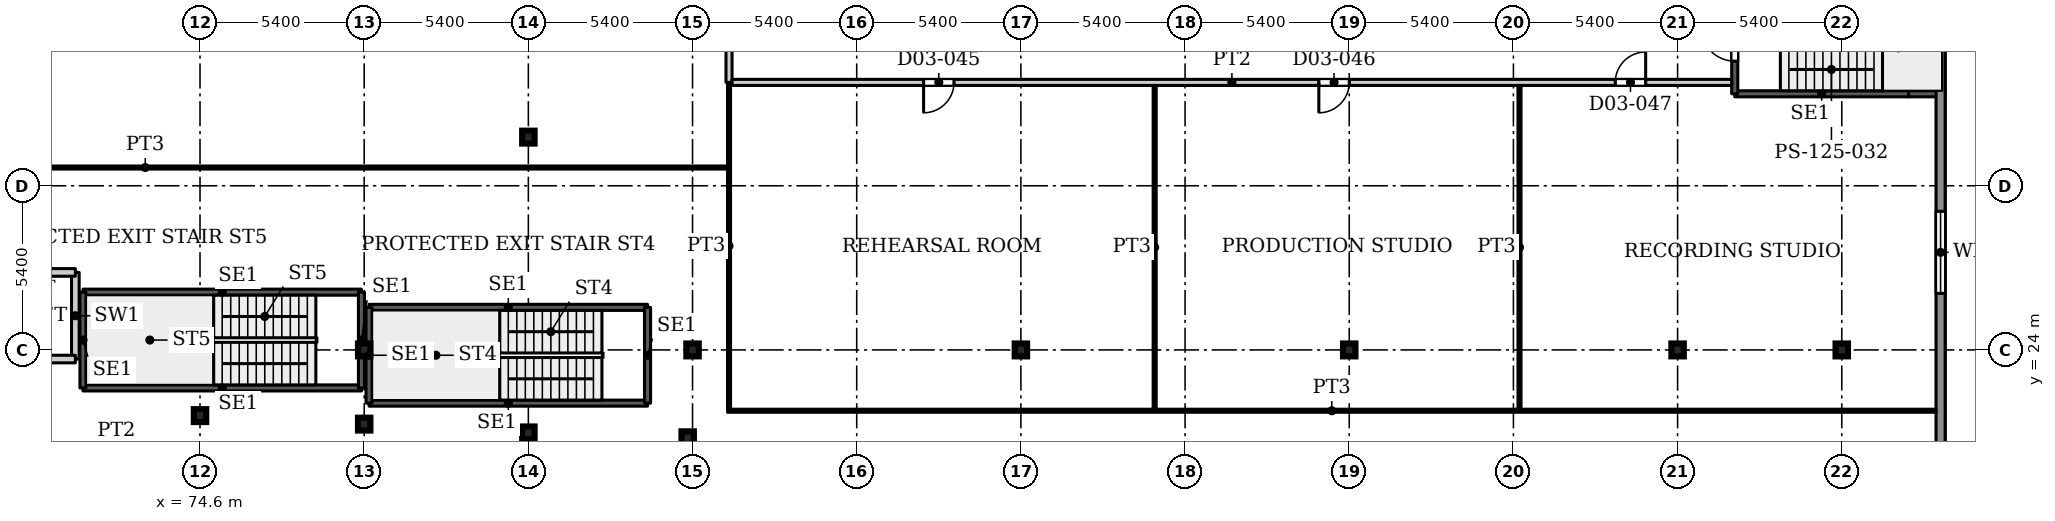
"""IFC4 building model, lengths in metres.
Left out: names, types, materials, properties, quantities, classifications, styles, units other than length and angle.
Written with IfcOpenShell. Run it as: python <this file> out.ifc"""

import sys

from ifc_helpers import new_model, si_unit, direction, frame, frame_2d, origin, origin_2d, place, context, subcontext, project, spatial, rectangle, i_section, extrude, source, transform, mapped, element, fill, save


model = new_model("IFC4")
c1 = context("Model", 3, precision=1e-05, world=origin(), true_north=direction((0.0, 1.0)))
c2 = subcontext(c1, "Body", "Model", "MODEL_VIEW")
j1 = project(units=[si_unit("LENGTHUNIT", "METRE"), si_unit("PLANEANGLEUNIT", "RADIAN")], contexts=[c1])
p1 = place(None, origin())
s1 = spatial("IfcSite", under=j1, at=p1, CompositionType="ELEMENT")
p2 = place(p1, origin())
s2 = spatial("IfcBuilding", under=s1, at=p2, CompositionType="ELEMENT")
p3 = place(p2, frame((0.0, 0.0, 17.0)))
s3 = spatial("IfcBuildingStorey", under=s2, at=p3, CompositionType="ELEMENT", Elevation=17.0)
for number, where, z_axis, x_axis in (
    (1, (80.0, 24.0, 0.0), (0.0, 0.0, 1.0), (1.0, 0.0, 0.0)),
    (2, (90.8, 24.0, 0.0), (0.0, 0.0, 1.0), (1.0, 0.0, 0.0)),
    (3, (101.6, 24.0, 0.0), (0.0, 0.0, 1.0), (1.0, 0.0, 0.0)),
    (4, (112.4, 24.0, 0.0), (0.0, 0.0, 1.0), (1.0, 0.0, 0.0)),
    (5, (123.2, 24.0, 0.0), (0.0, 0.0, 1.0), (1.0, 0.0, 0.0)),
    (6, (128.6, 24.0, 0.0), (0.0, 0.0, 1.0), (1.0, 0.0, 0.0)),
    (7, (90.64, 21.11, 0.0), (0.0, 0.0, 1.0), (1.0, 0.0, 0.0)),
    (8, (85.4, 21.27, 0.0), (0.0, 0.0, 1.0), (1.0, 0.0, 0.0)),
    (9, (80.0, 21.56, 0.0), (0.0, 0.0, 1.0), (1.0, 0.0, 0.0)),
    (10, (74.6, 21.84, 0.0), (0.0, 0.0, 1.0), (1.0, 0.0, 0.0)),
    (11, (85.4, 31.0, 0.0), (0.0, 0.0, 1.0), (1.0, 0.0, 0.0)),
):
    element("IfcColumn", number, at=place(p3, frame(where, z_axis=z_axis, x_axis=x_axis)), inside=s3, PredefinedType="COLUMN", context=c2, shape_type="SweptSolid", body=[
        extrude(i_section(OverallWidth=0.409, OverallDepth=0.425, WebThickness=0.033, FlangeThickness=0.052, FilletRadius=0.013, at=origin_2d()), origin(), (0.0, 0.0, 1.0), 4.5),
    ])
p4 = place(p3, frame((131.85, 54.72, 0.0), z_axis=(0.0, 0.0, 1.0), x_axis=(0.0, -1.0, 0.0)))
e12 = element("IfcWall", 12, at=p4, inside=s3, PredefinedType="SOLIDWALL", context=c2, shape_type="SweptSolid", body=[
    extrude(rectangle(XDim=38.72, YDim=0.3, at=frame_2d((19.36, 0.0))), origin(), (0.0, 0.0, 1.0), 4.25),
])
p5 = place(p4, frame((2.435, 0.0, 0.9)))
e13 = element("IfcOpeningElement", 13, at=p5, cuts=e12, PredefinedType="OPENING", context=c2, shape_type="SweptSolid", body=[
    extrude(rectangle(XDim=2.7, YDim=2.1, at=frame_2d((1.35, 1.05))), frame((0.0, 0.16, 0.0), z_axis=(0.0, -1.0, 0.0), x_axis=(1.0, 0.0, 0.0)), (0.0, 0.0, 1.0), 0.32),
])
p6 = place(p4, frame((13.58, 0.0, 0.9)))
e14 = element("IfcOpeningElement", 14, at=p6, cuts=e12, PredefinedType="OPENING", context=c2, shape_type="SweptSolid", body=[
    extrude(rectangle(XDim=2.7, YDim=2.1, at=frame_2d((1.35, 1.05))), frame((0.0, 0.16, 0.0), z_axis=(0.0, -1.0, 0.0), x_axis=(1.0, 0.0, 0.0)), (0.0, 0.0, 1.0), 0.32),
])
p7 = place(p4, frame((26.16, 0.0, 0.9)))
e15 = element("IfcOpeningElement", 15, at=p7, cuts=e12, PredefinedType="OPENING", context=c2, shape_type="SweptSolid", body=[
    extrude(rectangle(XDim=2.7, YDim=2.1, at=frame_2d((1.35, 1.05))), frame((0.0, 0.16, 0.0), z_axis=(0.0, -1.0, 0.0), x_axis=(1.0, 0.0, 0.0)), (0.0, 0.0, 1.0), 0.32),
])
for number, where, z_axis, x_axis in (
    (16, (80.16, 22.25, 0.0), (0.0, 0.0, 1.0), (1.0, 0.0, 0.0)),
    (17, (80.16, 25.4, 0.0), (0.0, 0.0, 1.0), (1.0, 0.0, 0.0)),
):
    element("IfcWall", number, at=place(p3, frame(where, z_axis=z_axis, x_axis=x_axis)), inside=s3, PredefinedType="SHEAR", context=c2, shape_type="SweptSolid", body=[
        extrude(rectangle(XDim=9.16, YDim=0.2, at=frame_2d((4.58, 0.0))), origin(), (0.0, 0.0, 1.0), 4.5),
    ])
for number, where, z_axis, x_axis in (
    (18, (80.16, 22.25, 0.0), (0.0, 0.0, 1.0), (0.0, 1.0, 0.0)),
    (19, (89.32, 22.25, 0.0), (0.0, 0.0, 1.0), (0.0, 1.0, 0.0)),
):
    element("IfcWall", number, at=place(p3, frame(where, z_axis=z_axis, x_axis=x_axis)), inside=s3, PredefinedType="SHEAR", context=c2, shape_type="SweptSolid", body=[
        extrude(rectangle(XDim=3.15, YDim=0.2, at=frame_2d((1.575, 0.0))), origin(), (0.0, 0.0, 1.0), 4.5),
    ])
for number, where, z_axis, x_axis in (
    (20, (70.75, 22.75, 0.0), (0.0, 0.0, 1.0), (1.0, 0.0, 0.0)),
    (21, (70.75, 25.9, 0.0), (0.0, 0.0, 1.0), (1.0, 0.0, 0.0)),
):
    element("IfcWall", number, at=place(p3, frame(where, z_axis=z_axis, x_axis=x_axis)), inside=s3, PredefinedType="SHEAR", context=c2, shape_type="SweptSolid", body=[
        extrude(rectangle(XDim=9.16, YDim=0.2, at=frame_2d((4.58, 0.0))), origin(), (0.0, 0.0, 1.0), 4.5),
    ])
for number, where, z_axis, x_axis in (
    (22, (70.75, 22.75, 0.0), (0.0, 0.0, 1.0), (0.0, 1.0, 0.0)),
    (23, (79.91, 22.75, 0.0), (0.0, 0.0, 1.0), (0.0, 1.0, 0.0)),
):
    element("IfcWall", number, at=place(p3, frame(where, z_axis=z_axis, x_axis=x_axis)), inside=s3, PredefinedType="SHEAR", context=c2, shape_type="SweptSolid", body=[
        extrude(rectangle(XDim=3.15, YDim=0.2, at=frame_2d((1.575, 0.0))), origin(), (0.0, 0.0, 1.0), 4.5),
    ])
p8 = place(p3, frame((70.5, 23.7, 0.0), z_axis=(0.0, 0.0, 1.0), x_axis=(0.0, 1.0, 0.0)))
e24 = element("IfcWall", 24, at=p8, inside=s3, PredefinedType="PARTITIONING", context=c2, shape_type="SweptSolid", body=[
    extrude(rectangle(XDim=2.85, YDim=0.25, at=frame_2d((1.425, 0.0))), origin(), (0.0, 0.0, 1.0), 4.5),
])
for number, where, z_axis, x_axis in (
    (25, (53.4, 23.7, 0.0), (0.0, 0.0, 1.0), (1.0, 0.0, 0.0)),
    (26, (53.4, 26.55, 0.0), (0.0, 0.0, 1.0), (1.0, 0.0, 0.0)),
):
    element("IfcWall", number, at=place(p3, frame(where, z_axis=z_axis, x_axis=x_axis)), inside=s3, PredefinedType="PARTITIONING", context=c2, shape_type="SweptSolid", body=[
        extrude(rectangle(XDim=17.1, YDim=0.25, at=frame_2d((8.55, 0.0))), origin(), (0.0, 0.0, 1.0), 4.5),
    ])
p9 = place(p3, frame((125.08, 32.425, 0.0), z_axis=(0.0, 0.0, 1.0), x_axis=(1.0, 0.0, 0.0)))
e27 = element("IfcWall", 27, at=p9, inside=s3, PredefinedType="SHEAR", context=c2, shape_type="SweptSolid", body=[
    extrude(rectangle(XDim=5.72, YDim=0.2, at=frame_2d((2.86, 0.0))), origin(), (0.0, 0.0, 1.0), 4.5),
])
p10 = place(p3, frame((130.8, 32.425, 0.0), z_axis=(0.0, 0.0, 1.0), x_axis=(1.0, 0.0, 0.0)))
e28 = element("IfcWall", 28, at=p10, inside=s3, PredefinedType="SHEAR", context=c2, shape_type="SweptSolid", body=[
    extrude(rectangle(XDim=1.2, YDim=0.2, at=frame_2d((0.6, 0.0))), origin(), (0.0, 0.0, 1.0), 4.5),
])
p11 = place(p3, frame((125.08, 32.425, 0.0), z_axis=(0.0, 0.0, 1.0), x_axis=(0.0, 1.0, 0.0)))
e29 = element("IfcWall", 29, at=p11, inside=s3, PredefinedType="SHEAR", context=c2, shape_type="SweptSolid", body=[
    extrude(rectangle(XDim=3.15, YDim=0.2, at=frame_2d((1.575, 0.0))), origin(), (0.0, 0.0, 1.0), 4.5),
])
p12 = place(p11, frame((1.075, 0.0, 0.0)))
e30 = element("IfcOpeningElement", 30, at=p12, cuts=e29, PredefinedType="OPENING", context=c2, shape_type="SweptSolid", body=[
    extrude(rectangle(XDim=1.1, YDim=2.2, at=frame_2d((0.55, 1.1))), frame((0.0, 0.11, 0.0), z_axis=(0.0, -1.0, 0.0), x_axis=(1.0, 0.0, 0.0)), (0.0, 0.0, 1.0), 0.22),
])
p13 = place(p3, frame((53.649, 30.0, 0.0), z_axis=(0.0, 0.0, 1.0), x_axis=(1.0, 0.0, 0.0)))
e31 = element("IfcWall", 31, at=p13, inside=s3, PredefinedType="PARTITIONING", context=c2, shape_type="SweptSolid", body=[
    extrude(rectangle(XDim=38.301, YDim=0.1, at=frame_2d((19.15, 0.0))), origin(), (0.0, 0.0, 1.0), 4.18),
])
p14 = place(p3, frame((91.95, 22.0, 0.0), z_axis=(0.0, 0.0, 1.0), x_axis=(1.0, 0.0, 0.0)))
e32 = element("IfcWall", 32, at=p14, inside=s3, PredefinedType="PARTITIONING", context=c2, shape_type="SweptSolid", body=[
    extrude(rectangle(XDim=39.751, YDim=0.1, at=frame_2d((19.875, 0.0))), origin(), (0.0, 0.0, 1.0), 4.18),
])
p15 = place(p3, frame((92.0, 22.05, 0.0), z_axis=(0.0, 0.0, 1.0), x_axis=(0.0, 1.0, 0.0)))
e33 = element("IfcWall", 33, at=p15, inside=s3, PredefinedType="PARTITIONING", context=c2, shape_type="SweptSolid", body=[
    extrude(rectangle(XDim=10.75, YDim=0.1, at=frame_2d((5.375, 0.0))), origin(), (0.0, 0.0, 1.0), 4.18),
])
p16 = place(p3, frame((92.0, 32.8, 0.0), z_axis=(0.0, 0.0, 1.0), x_axis=(0.0, 1.0, 0.0)))
e34 = element("IfcWall", 34, at=p16, inside=s3, PredefinedType="PARTITIONING", context=c2, shape_type="SweptSolid", body=[
    extrude(rectangle(XDim=2.4, YDim=0.2, at=frame_2d((1.2, 0.0))), origin(), (0.0, 0.0, 1.0), 4.18),
])
p17 = place(p3, frame((92.1, 32.8, 0.0), z_axis=(0.0, 0.0, 1.0), x_axis=(1.0, 0.0, 0.0)))
e35 = element("IfcWall", 35, at=p17, inside=s3, PredefinedType="PARTITIONING", context=c2, shape_type="SweptSolid", body=[
    extrude(rectangle(XDim=32.881, YDim=0.2, at=frame_2d((16.44, 0.0))), origin(), (0.0, 0.0, 1.0), 4.18),
])
p18 = place(p17, frame((6.3, 0.0, 0.0)))
e36 = element("IfcOpeningElement", 36, at=p18, cuts=e35, PredefinedType="OPENING", context=c2, shape_type="SweptSolid", body=[
    extrude(rectangle(XDim=1.0, YDim=2.1, at=frame_2d((0.5, 1.05))), frame((0.0, 0.11, 0.0), z_axis=(0.0, -1.0, 0.0), x_axis=(1.0, 0.0, 0.0)), (0.0, 0.0, 1.0), 0.22),
])
p19 = place(p17, frame((19.3, 0.0, 0.0)))
e37 = element("IfcOpeningElement", 37, at=p19, cuts=e35, PredefinedType="OPENING", context=c2, shape_type="SweptSolid", body=[
    extrude(rectangle(XDim=1.0, YDim=2.1, at=frame_2d((0.5, 1.05))), frame((0.0, 0.11, 0.0), z_axis=(0.0, -1.0, 0.0), x_axis=(1.0, 0.0, 0.0)), (0.0, 0.0, 1.0), 0.22),
])
p20 = place(p17, frame((29.05, 0.0, 0.0)))
e38 = element("IfcOpeningElement", 38, at=p20, cuts=e35, PredefinedType="OPENING", context=c2, shape_type="SweptSolid", body=[
    extrude(rectangle(XDim=1.0, YDim=2.1, at=frame_2d((0.5, 1.05))), frame((0.0, 0.11, 0.0), z_axis=(0.0, -1.0, 0.0), x_axis=(1.0, 0.0, 0.0)), (0.0, 0.0, 1.0), 0.22),
])
for number, where, z_axis, x_axis in (
    (39, (106.0, 22.05, 0.0), (0.0, 0.0, 1.0), (0.0, 1.0, 0.0)),
    (40, (118.0, 22.05, 0.0), (0.0, 0.0, 1.0), (0.0, 1.0, 0.0)),
):
    element("IfcWall", number, at=place(p3, frame(where, z_axis=z_axis, x_axis=x_axis)), inside=s3, PredefinedType="PARTITIONING", context=c2, shape_type="SweptSolid", body=[
        extrude(rectangle(XDim=10.65, YDim=0.1, at=frame_2d((5.325, 0.0))), origin(), (0.0, 0.0, 1.0), 4.18),
    ])
m1 = source(origin(), c2, "Body", "SweptSolid", [
    extrude(rectangle(XDim=2.7, YDim=2.1, at=frame_2d((1.35, 1.05))), frame((0.0, 0.03, 0.0), z_axis=(0.0, -1.0, 0.0), x_axis=(1.0, 0.0, 0.0)), (0.0, 0.0, 1.0), 0.06),
])
p21 = place(p7, origin())
e41 = element("IfcWindow", 41, at=p21, inside=s3, PartitioningType="SINGLE_PANEL", PredefinedType="WINDOW", context=c2, shape_type="MappedRepresentation", body=[
    mapped(m1, transform((0.0, 0.0, 0.0), x_axis=(1.0, 0.0, 0.0), y_axis=(0.0, 1.0, 0.0), z_axis=(0.0, 0.0, 1.0), scale=1.0)),
])
fill(e15, e41)
m2 = source(origin(), c2, "Body", "SweptSolid", [
    extrude(rectangle(XDim=1.1, YDim=2.2, at=frame_2d((0.55, 1.1))), frame((0.0, 0.025, 0.0), z_axis=(0.0, -1.0, 0.0), x_axis=(1.0, 0.0, 0.0)), (0.0, 0.0, 1.0), 0.05),
])
p22 = place(p12, origin())
e42 = element("IfcDoor", 42, at=p22, inside=s3, OperationType="SINGLE_SWING_LEFT", PredefinedType="DOOR", context=c2, shape_type="MappedRepresentation", body=[
    mapped(m2, transform((0.0, 0.0, 0.0), x_axis=(1.0, 0.0, 0.0), y_axis=(0.0, 1.0, 0.0), z_axis=(0.0, 0.0, 1.0), scale=1.0)),
])
fill(e30, e42)
m3 = source(origin(), c2, "Body", "SweptSolid", [
    extrude(rectangle(XDim=1.0, YDim=2.1, at=frame_2d((0.5, 1.05))), frame((0.0, 0.025, 0.0), z_axis=(0.0, -1.0, 0.0), x_axis=(1.0, 0.0, 0.0)), (0.0, 0.0, 1.0), 0.05),
])
p23 = place(p18, origin())
e43 = element("IfcDoor", 43, at=p23, inside=s3, OperationType="SINGLE_SWING_RIGHT", PredefinedType="DOOR", context=c2, shape_type="MappedRepresentation", body=[
    mapped(m3, transform((0.0, 0.0, 0.0), x_axis=(1.0, 0.0, 0.0), y_axis=(0.0, 1.0, 0.0), z_axis=(0.0, 0.0, 1.0), scale=1.0)),
])
fill(e36, e43)
p24 = place(p19, origin())
e44 = element("IfcDoor", 44, at=p24, inside=s3, OperationType="SINGLE_SWING_RIGHT", PredefinedType="DOOR", context=c2, shape_type="MappedRepresentation", body=[
    mapped(m3, transform((0.0, 0.0, 0.0), x_axis=(1.0, 0.0, 0.0), y_axis=(0.0, 1.0, 0.0), z_axis=(0.0, 0.0, 1.0), scale=1.0)),
])
fill(e37, e44)
p25 = place(p20, origin())
e45 = element("IfcDoor", 45, at=p25, inside=s3, OperationType="SINGLE_SWING_LEFT", PredefinedType="DOOR", context=c2, shape_type="MappedRepresentation", body=[
    mapped(m3, transform((0.0, 0.0, 0.0), x_axis=(1.0, 0.0, 0.0), y_axis=(0.0, 1.0, 0.0), z_axis=(0.0, 0.0, 1.0), scale=1.0)),
])
fill(e38, e45)
save(model, sys.argv[1])
